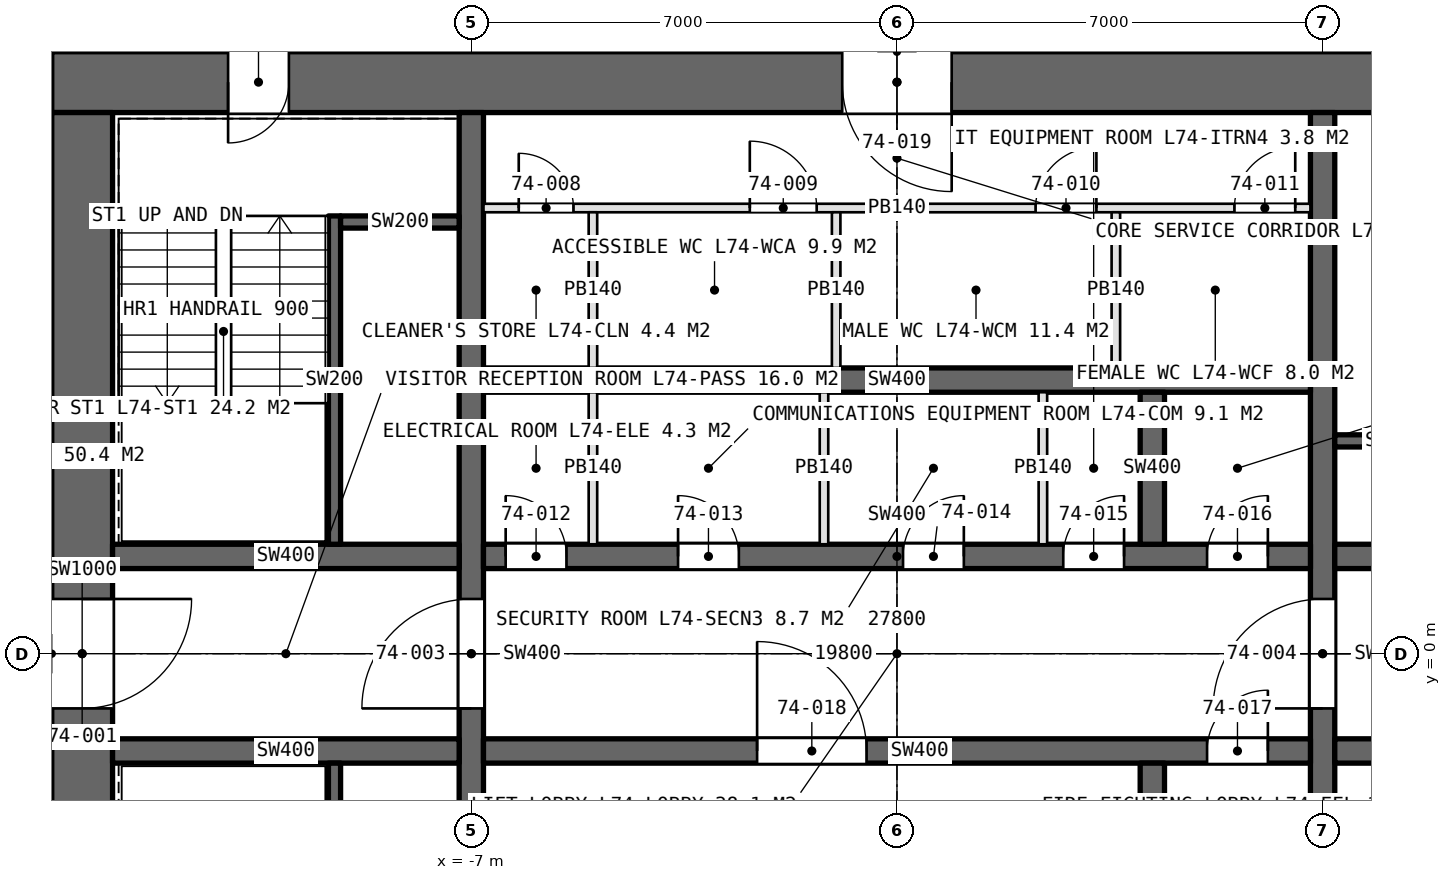
"""IFC4 building model, lengths in metres.
Left out: names, types, materials, properties, quantities, classifications, styles, units other than length and angle.
Written with IfcOpenShell. Run it as: python <this file> out.ifc"""

import sys

from ifc_helpers import new_model, si_unit, direction, frame, frame_2d, origin, place, context, subcontext, project, spatial, rectangle, extrude, element, fill, save


model = new_model("IFC4")
c1 = context("Model", 3, precision=1e-05, world=origin(), true_north=direction((0.0, 1.0)))
c2 = subcontext(c1, "Body", "Model", "MODEL_VIEW")
j1 = project(units=[si_unit("LENGTHUNIT", "METRE"), si_unit("PLANEANGLEUNIT", "RADIAN")], contexts=[c1])
p1 = place(None, origin())
s1 = spatial("IfcSite", under=j1, at=p1, CompositionType="ELEMENT")
p2 = place(p1, origin())
s2 = spatial("IfcBuilding", under=s1, at=p2, CompositionType="ELEMENT")
p3 = place(p2, frame((0.0, 0.0, 330.0)))
s3 = spatial("IfcBuildingStorey", under=s2, at=p3, CompositionType="ELEMENT", Elevation=330.0)
p4 = place(p3, frame((13.9, 9.4, 0.0), z_axis=(0.0, 0.0, 1.0), x_axis=(-1.0, 0.0, 0.0)))
e1 = element("IfcWall", 1, at=p4, inside=s3, PredefinedType="SHEAR", context=c2, shape_type="SweptSolid", body=[
    extrude(rectangle(XDim=27.8, YDim=1.0, at=frame_2d((13.9, 0.0))), origin(), (0.0, 0.0, 1.0), 4.2),
])
p5 = place(p4, frame((23.9, 0.0, 0.0)))
e2 = element("IfcOpeningElement", 2, at=p5, cuts=e1, PredefinedType="OPENING", context=c2, shape_type="SweptSolid", body=[
    extrude(rectangle(XDim=1.0, YDim=2.4, at=frame_2d((0.5, 1.2))), frame((0.0, 0.51, 0.0), z_axis=(0.0, -1.0, 0.0), x_axis=(1.0, 0.0, 0.0)), (0.0, 0.0, 1.0), 1.02),
])
p6 = place(p4, frame((13.0, 0.0, 0.0)))
e3 = element("IfcOpeningElement", 3, at=p6, cuts=e1, PredefinedType="OPENING", context=c2, shape_type="SweptSolid", body=[
    extrude(rectangle(XDim=1.8, YDim=2.4, at=frame_2d((0.9, 1.2))), frame((0.0, 0.51, 0.0), z_axis=(0.0, -1.0, 0.0), x_axis=(1.0, 0.0, 0.0)), (0.0, 0.0, 1.0), 1.02),
])
p7 = place(p3, frame((-13.4, 8.9, 0.0), z_axis=(0.0, 0.0, 1.0), x_axis=(0.0, -1.0, 0.0)))
e4 = element("IfcWall", 4, at=p7, inside=s3, PredefinedType="SHEAR", context=c2, shape_type="SweptSolid", body=[
    extrude(rectangle(XDim=17.8, YDim=1.0, at=frame_2d((8.9, 0.0))), origin(), (0.0, 0.0, 1.0), 4.2),
])
p8 = place(p7, frame((8.0, 0.0, 0.0)))
e5 = element("IfcOpeningElement", 5, at=p8, cuts=e4, PredefinedType="OPENING", context=c2, shape_type="SweptSolid", body=[
    extrude(rectangle(XDim=1.8, YDim=2.4, at=frame_2d((0.9, 1.2))), frame((0.0, 0.51, 0.0), z_axis=(0.0, -1.0, 0.0), x_axis=(1.0, 0.0, 0.0)), (0.0, 0.0, 1.0), 1.02),
])
p9 = place(p7, frame((16.6, 0.0, 0.0)))
e6 = element("IfcOpeningElement", 6, at=p9, cuts=e4, PredefinedType="OPENING", context=c2, shape_type="SweptSolid", body=[
    extrude(rectangle(XDim=1.0, YDim=2.4, at=frame_2d((0.5, 1.2))), frame((0.0, 0.51, 0.0), z_axis=(0.0, -1.0, 0.0), x_axis=(1.0, 0.0, 0.0)), (0.0, 0.0, 1.0), 1.02),
])
p10 = place(p3, frame((-7.0, -8.9, 0.0), z_axis=(0.0, 0.0, 1.0), x_axis=(0.0, 1.0, 0.0)))
e7 = element("IfcWall", 7, at=p10, inside=s3, PredefinedType="SHEAR", context=c2, shape_type="SweptSolid", body=[
    extrude(rectangle(XDim=17.8, YDim=0.4, at=frame_2d((8.9, 0.0))), origin(), (0.0, 0.0, 1.0), 4.2),
])
p11 = place(p10, frame((8.0, 0.0, 0.0)))
e8 = element("IfcOpeningElement", 8, at=p11, cuts=e7, PredefinedType="OPENING", context=c2, shape_type="SweptSolid", body=[
    extrude(rectangle(XDim=1.8, YDim=2.4, at=frame_2d((0.9, 1.2))), frame((0.0, 0.21, 0.0), z_axis=(0.0, -1.0, 0.0), x_axis=(1.0, 0.0, 0.0)), (0.0, 0.0, 1.0), 0.42),
])
p12 = place(p3, frame((7.0, -8.9, 0.0), z_axis=(0.0, 0.0, 1.0), x_axis=(0.0, 1.0, 0.0)))
e9 = element("IfcWall", 9, at=p12, inside=s3, PredefinedType="SHEAR", context=c2, shape_type="SweptSolid", body=[
    extrude(rectangle(XDim=17.8, YDim=0.4, at=frame_2d((8.9, 0.0))), origin(), (0.0, 0.0, 1.0), 4.2),
])
p13 = place(p12, frame((8.0, 0.0, 0.0)))
e10 = element("IfcOpeningElement", 10, at=p13, cuts=e9, PredefinedType="OPENING", context=c2, shape_type="SweptSolid", body=[
    extrude(rectangle(XDim=1.8, YDim=2.4, at=frame_2d((0.9, 1.2))), frame((0.0, 0.21, 0.0), z_axis=(0.0, -1.0, 0.0), x_axis=(1.0, 0.0, 0.0)), (0.0, 0.0, 1.0), 0.42),
])
p14 = place(p3, frame((-6.8, 1.6, 0.0), z_axis=(0.0, 0.0, 1.0), x_axis=(1.0, 0.0, 0.0)))
e11 = element("IfcWall", 11, at=p14, inside=s3, PredefinedType="SHEAR", context=c2, shape_type="SweptSolid", body=[
    extrude(rectangle(XDim=13.6, YDim=0.4, at=frame_2d((6.8, 0.0))), origin(), (0.0, 0.0, 1.0), 4.2),
])
p15 = place(p14, frame((0.365, 0.0, 0.0)))
e12 = element("IfcOpeningElement", 12, at=p15, cuts=e11, PredefinedType="OPENING", context=c2, shape_type="SweptSolid", body=[
    extrude(rectangle(XDim=1.0, YDim=2.4, at=frame_2d((0.5, 1.2))), frame((0.0, 0.21, 0.0), z_axis=(0.0, -1.0, 0.0), x_axis=(1.0, 0.0, 0.0)), (0.0, 0.0, 1.0), 0.42),
])
p16 = place(p14, frame((3.2, 0.0, 0.0)))
e13 = element("IfcOpeningElement", 13, at=p16, cuts=e11, PredefinedType="OPENING", context=c2, shape_type="SweptSolid", body=[
    extrude(rectangle(XDim=1.0, YDim=2.4, at=frame_2d((0.5, 1.2))), frame((0.0, 0.21, 0.0), z_axis=(0.0, -1.0, 0.0), x_axis=(1.0, 0.0, 0.0)), (0.0, 0.0, 1.0), 0.42),
])
p17 = place(p14, frame((6.9, 0.0, 0.0)))
e14 = element("IfcOpeningElement", 14, at=p17, cuts=e11, PredefinedType="OPENING", context=c2, shape_type="SweptSolid", body=[
    extrude(rectangle(XDim=1.0, YDim=2.4, at=frame_2d((0.5, 1.2))), frame((0.0, 0.21, 0.0), z_axis=(0.0, -1.0, 0.0), x_axis=(1.0, 0.0, 0.0)), (0.0, 0.0, 1.0), 0.42),
])
p18 = place(p14, frame((9.535, 0.0, 0.0)))
e15 = element("IfcOpeningElement", 15, at=p18, cuts=e11, PredefinedType="OPENING", context=c2, shape_type="SweptSolid", body=[
    extrude(rectangle(XDim=1.0, YDim=2.4, at=frame_2d((0.5, 1.2))), frame((0.0, 0.21, 0.0), z_axis=(0.0, -1.0, 0.0), x_axis=(1.0, 0.0, 0.0)), (0.0, 0.0, 1.0), 0.42),
])
p19 = place(p14, frame((11.9, 0.0, 0.0)))
e16 = element("IfcOpeningElement", 16, at=p19, cuts=e11, PredefinedType="OPENING", context=c2, shape_type="SweptSolid", body=[
    extrude(rectangle(XDim=1.0, YDim=2.4, at=frame_2d((0.5, 1.2))), frame((0.0, 0.21, 0.0), z_axis=(0.0, -1.0, 0.0), x_axis=(1.0, 0.0, 0.0)), (0.0, 0.0, 1.0), 0.42),
])
p20 = place(p3, frame((-6.8, -1.6, 0.0), z_axis=(0.0, 0.0, 1.0), x_axis=(1.0, 0.0, 0.0)))
e17 = element("IfcWall", 17, at=p20, inside=s3, PredefinedType="SHEAR", context=c2, shape_type="SweptSolid", body=[
    extrude(rectangle(XDim=13.6, YDim=0.4, at=frame_2d((6.8, 0.0))), origin(), (0.0, 0.0, 1.0), 4.2),
])
p21 = place(p20, frame((11.9, 0.0, 0.0)))
e18 = element("IfcOpeningElement", 18, at=p21, cuts=e17, PredefinedType="OPENING", context=c2, shape_type="SweptSolid", body=[
    extrude(rectangle(XDim=1.0, YDim=2.4, at=frame_2d((0.5, 1.2))), frame((0.0, 0.21, 0.0), z_axis=(0.0, -1.0, 0.0), x_axis=(1.0, 0.0, 0.0)), (0.0, 0.0, 1.0), 0.42),
])
p22 = place(p20, frame((4.5, 0.0, 0.0)))
e19 = element("IfcOpeningElement", 19, at=p22, cuts=e17, PredefinedType="OPENING", context=c2, shape_type="SweptSolid", body=[
    extrude(rectangle(XDim=1.8, YDim=2.4, at=frame_2d((0.9, 1.2))), frame((0.0, 0.21, 0.0), z_axis=(0.0, -1.0, 0.0), x_axis=(1.0, 0.0, 0.0)), (0.0, 0.0, 1.0), 0.42),
])
p23 = place(p3, frame((-6.8, 4.5, 0.0), z_axis=(0.0, 0.0, 1.0), x_axis=(1.0, 0.0, 0.0)))
e20 = element("IfcWall", 20, at=p23, inside=s3, PredefinedType="SHEAR", context=c2, shape_type="SweptSolid", body=[
    extrude(rectangle(XDim=13.6, YDim=0.4, at=frame_2d((6.8, 0.0))), origin(), (0.0, 0.0, 1.0), 4.2),
])
for number, where, z_axis, x_axis in (
    (21, (-12.9, 1.6, 0.0), (0.0, 0.0, 1.0), (1.0, 0.0, 0.0)),
    (22, (-12.9, -1.6, 0.0), (0.0, 0.0, 1.0), (1.0, 0.0, 0.0)),
):
    element("IfcWall", number, at=place(p3, frame(where, z_axis=z_axis, x_axis=x_axis)), inside=s3, PredefinedType="SHEAR", context=c2, shape_type="SweptSolid", body=[
        extrude(rectangle(XDim=5.7, YDim=0.4, at=frame_2d((2.85, 0.0))), origin(), (0.0, 0.0, 1.0), 4.2),
    ])
p24 = place(p3, frame((7.2, 1.6, 0.0), z_axis=(0.0, 0.0, 1.0), x_axis=(1.0, 0.0, 0.0)))
e23 = element("IfcWall", 23, at=p24, inside=s3, PredefinedType="SHEAR", context=c2, shape_type="SweptSolid", body=[
    extrude(rectangle(XDim=5.7, YDim=0.4, at=frame_2d((2.85, 0.0))), origin(), (0.0, 0.0, 1.0), 4.2),
])
p25 = place(p24, frame((0.7, 0.0, 0.0)))
e24 = element("IfcOpeningElement", 24, at=p25, cuts=e23, PredefinedType="OPENING", context=c2, shape_type="SweptSolid", body=[
    extrude(rectangle(XDim=1.0, YDim=2.4, at=frame_2d((0.5, 1.2))), frame((0.0, 0.21, 0.0), z_axis=(0.0, -1.0, 0.0), x_axis=(1.0, 0.0, 0.0)), (0.0, 0.0, 1.0), 0.42),
])
p26 = place(p3, frame((7.2, -1.6, 0.0), z_axis=(0.0, 0.0, 1.0), x_axis=(1.0, 0.0, 0.0)))
e25 = element("IfcWall", 25, at=p26, inside=s3, PredefinedType="SHEAR", context=c2, shape_type="SweptSolid", body=[
    extrude(rectangle(XDim=5.7, YDim=0.4, at=frame_2d((2.85, 0.0))), origin(), (0.0, 0.0, 1.0), 4.2),
])
p27 = place(p26, frame((0.9, 0.0, 0.0)))
e26 = element("IfcOpeningElement", 26, at=p27, cuts=e25, PredefinedType="OPENING", context=c2, shape_type="SweptSolid", body=[
    extrude(rectangle(XDim=1.3, YDim=2.4, at=frame_2d((0.65, 1.2))), frame((0.0, 0.21, 0.0), z_axis=(0.0, -1.0, 0.0), x_axis=(1.0, 0.0, 0.0)), (0.0, 0.0, 1.0), 0.42),
])
p28 = place(p26, frame((3.95, 0.0, 0.0)))
e27 = element("IfcOpeningElement", 27, at=p28, cuts=e25, PredefinedType="OPENING", context=c2, shape_type="SweptSolid", body=[
    extrude(rectangle(XDim=1.3, YDim=2.4, at=frame_2d((0.65, 1.2))), frame((0.0, 0.21, 0.0), z_axis=(0.0, -1.0, 0.0), x_axis=(1.0, 0.0, 0.0)), (0.0, 0.0, 1.0), 0.42),
])
for number, where, z_axis, x_axis in (
    (28, (4.2, 1.8, 0.0), (0.0, 0.0, 1.0), (0.0, 1.0, 0.0)),
    (29, (4.2, -4.3, 0.0), (0.0, 0.0, 1.0), (0.0, 1.0, 0.0)),
):
    element("IfcWall", number, at=place(p3, frame(where, z_axis=z_axis, x_axis=x_axis)), inside=s3, PredefinedType="SHEAR", context=c2, shape_type="SweptSolid", body=[
        extrude(rectangle(XDim=2.5, YDim=0.4, at=frame_2d((1.25, 0.0))), origin(), (0.0, 0.0, 1.0), 4.2),
    ])
p29 = place(p3, frame((-6.8, 7.33, 0.0), z_axis=(0.0, 0.0, 1.0), x_axis=(1.0, 0.0, 0.0)))
e30 = element("IfcWall", 30, at=p29, inside=s3, PredefinedType="PARTITIONING", context=c2, shape_type="SweptSolid", body=[
    extrude(rectangle(XDim=13.6, YDim=0.14, at=frame_2d((6.8, 0.0))), origin(), (0.0, 0.0, 1.0), 3.95),
])
p30 = place(p29, frame((0.58, 0.0, 0.0)))
e31 = element("IfcOpeningElement", 31, at=p30, cuts=e30, PredefinedType="OPENING", context=c2, shape_type="SweptSolid", body=[
    extrude(rectangle(XDim=0.9, YDim=2.4, at=frame_2d((0.45, 1.2))), frame((0.0, 0.08, 0.0), z_axis=(0.0, -1.0, 0.0), x_axis=(1.0, 0.0, 0.0)), (0.0, 0.0, 1.0), 0.16),
])
p31 = place(p29, frame((4.38, 0.0, 0.0)))
e32 = element("IfcOpeningElement", 32, at=p31, cuts=e30, PredefinedType="OPENING", context=c2, shape_type="SweptSolid", body=[
    extrude(rectangle(XDim=1.1, YDim=2.4, at=frame_2d((0.55, 1.2))), frame((0.0, 0.08, 0.0), z_axis=(0.0, -1.0, 0.0), x_axis=(1.0, 0.0, 0.0)), (0.0, 0.0, 1.0), 0.16),
])
p32 = place(p29, frame((9.08, 0.0, 0.0)))
e33 = element("IfcOpeningElement", 33, at=p32, cuts=e30, PredefinedType="OPENING", context=c2, shape_type="SweptSolid", body=[
    extrude(rectangle(XDim=1.0, YDim=2.4, at=frame_2d((0.5, 1.2))), frame((0.0, 0.08, 0.0), z_axis=(0.0, -1.0, 0.0), x_axis=(1.0, 0.0, 0.0)), (0.0, 0.0, 1.0), 0.16),
])
p33 = place(p29, frame((12.35, 0.0, 0.0)))
e34 = element("IfcOpeningElement", 34, at=p33, cuts=e30, PredefinedType="OPENING", context=c2, shape_type="SweptSolid", body=[
    extrude(rectangle(XDim=1.0, YDim=2.4, at=frame_2d((0.5, 1.2))), frame((0.0, 0.08, 0.0), z_axis=(0.0, -1.0, 0.0), x_axis=(1.0, 0.0, 0.0)), (0.0, 0.0, 1.0), 0.16),
])
for number, where, z_axis, x_axis in (
    (35, (-5.0, 4.7, 0.0), (0.0, 0.0, 1.0), (0.0, 1.0, 0.0)),
    (36, (-1.0, 4.7, 0.0), (0.0, 0.0, 1.0), (0.0, 1.0, 0.0)),
    (37, (3.6, 4.7, 0.0), (0.0, 0.0, 1.0), (0.0, 1.0, 0.0)),
):
    element("IfcWall", number, at=place(p3, frame(where, z_axis=z_axis, x_axis=x_axis)), inside=s3, PredefinedType="PARTITIONING", context=c2, shape_type="SweptSolid", body=[
        extrude(rectangle(XDim=2.56, YDim=0.14, at=frame_2d((1.28, 0.0))), origin(), (0.0, 0.0, 1.0), 3.95),
    ])
for number, where, z_axis, x_axis in (
    (38, (-5.0, 1.8, 0.0), (0.0, 0.0, 1.0), (0.0, 1.0, 0.0)),
    (39, (-1.2, 1.8, 0.0), (0.0, 0.0, 1.0), (0.0, 1.0, 0.0)),
    (40, (2.4, 1.8, 0.0), (0.0, 0.0, 1.0), (0.0, 1.0, 0.0)),
):
    element("IfcWall", number, at=place(p3, frame(where, z_axis=z_axis, x_axis=x_axis)), inside=s3, PredefinedType="PARTITIONING", context=c2, shape_type="SweptSolid", body=[
        extrude(rectangle(XDim=2.5, YDim=0.14, at=frame_2d((1.25, 0.0))), origin(), (0.0, 0.0, 1.0), 3.95),
    ])
p34 = place(p3, frame((-9.25, 7.2, 0.0), z_axis=(0.0, 0.0, 1.0), x_axis=(0.0, -1.0, 0.0)))
e41 = element("IfcWall", 41, at=p34, inside=s3, PredefinedType="SOLIDWALL", context=c2, shape_type="SweptSolid", body=[
    extrude(rectangle(XDim=5.4, YDim=0.2, at=frame_2d((2.7, 0.0))), origin(), (0.0, 0.0, 1.0), 4.2),
])
p35 = place(p3, frame((-9.15, 7.1, 0.0), z_axis=(0.0, 0.0, 1.0), x_axis=(1.0, 0.0, 0.0)))
e42 = element("IfcWall", 42, at=p35, inside=s3, PredefinedType="SOLIDWALL", context=c2, shape_type="SweptSolid", body=[
    extrude(rectangle(XDim=1.95, YDim=0.2, at=frame_2d((0.975, 0.0))), origin(), (0.0, 0.0, 1.0), 4.2),
])
p36 = place(p3, frame((-9.25, -7.2, 0.0), z_axis=(0.0, 0.0, 1.0), x_axis=(0.0, 1.0, 0.0)))
e43 = element("IfcWall", 43, at=p36, inside=s3, PredefinedType="SOLIDWALL", context=c2, shape_type="SweptSolid", body=[
    extrude(rectangle(XDim=5.4, YDim=0.2, at=frame_2d((2.7, 0.0))), origin(), (0.0, 0.0, 1.0), 4.2),
])
p37 = place(p3, frame((9.15, 3.5, 0.0), z_axis=(0.0, 0.0, 1.0), x_axis=(-1.0, 0.0, 0.0)))
e44 = element("IfcWall", 44, at=p37, inside=s3, PredefinedType="SOLIDWALL", context=c2, shape_type="SweptSolid", body=[
    extrude(rectangle(XDim=1.95, YDim=0.2, at=frame_2d((0.975, 0.0))), origin(), (0.0, 0.0, 1.0), 4.2),
])
p38 = place(p8, origin())
e45 = element("IfcDoor", 45, at=p38, inside=s3, OperationType="DOUBLE_DOOR_SINGLE_SWING", PredefinedType="DOOR", context=c2, shape_type="SweptSolid", body=[
    extrude(rectangle(XDim=1.8, YDim=2.4, at=frame_2d((0.9, 1.2))), frame((0.0, 0.025, 0.0), z_axis=(0.0, -1.0, 0.0), x_axis=(1.0, 0.0, 0.0)), (0.0, 0.0, 1.0), 0.05),
])
fill(e5, e45)
p39 = place(p11, origin())
e46 = element("IfcDoor", 46, at=p39, inside=s3, OperationType="DOUBLE_DOOR_SINGLE_SWING", PredefinedType="DOOR", context=c2, shape_type="SweptSolid", body=[
    extrude(rectangle(XDim=1.8, YDim=2.4, at=frame_2d((0.9, 1.2))), frame((0.0, 0.025, 0.0), z_axis=(0.0, -1.0, 0.0), x_axis=(1.0, 0.0, 0.0)), (0.0, 0.0, 1.0), 0.05),
])
fill(e8, e46)
p40 = place(p13, origin())
e47 = element("IfcDoor", 47, at=p40, inside=s3, OperationType="DOUBLE_DOOR_SINGLE_SWING", PredefinedType="DOOR", context=c2, shape_type="SweptSolid", body=[
    extrude(rectangle(XDim=1.8, YDim=2.4, at=frame_2d((0.9, 1.2))), frame((0.0, 0.025, 0.0), z_axis=(0.0, -1.0, 0.0), x_axis=(1.0, 0.0, 0.0)), (0.0, 0.0, 1.0), 0.05),
])
fill(e10, e47)
p41 = place(p5, origin())
e48 = element("IfcDoor", 48, at=p41, inside=s3, OperationType="SINGLE_SWING_RIGHT", PredefinedType="DOOR", context=c2, shape_type="SweptSolid", body=[
    extrude(rectangle(XDim=1.0, YDim=2.4, at=frame_2d((0.5, 1.2))), frame((0.0, 0.025, 0.0), z_axis=(0.0, -1.0, 0.0), x_axis=(1.0, 0.0, 0.0)), (0.0, 0.0, 1.0), 0.05),
])
fill(e2, e48)
p42 = place(p30, origin())
e49 = element("IfcDoor", 49, at=p42, inside=s3, OperationType="SINGLE_SWING_LEFT", PredefinedType="DOOR", context=c2, shape_type="SweptSolid", body=[
    extrude(rectangle(XDim=0.9, YDim=2.4, at=frame_2d((0.45, 1.2))), frame((0.0, 0.025, 0.0), z_axis=(0.0, -1.0, 0.0), x_axis=(1.0, 0.0, 0.0)), (0.0, 0.0, 1.0), 0.05),
])
fill(e31, e49)
p43 = place(p31, origin())
e50 = element("IfcDoor", 50, at=p43, inside=s3, OperationType="SINGLE_SWING_LEFT", PredefinedType="DOOR", context=c2, shape_type="SweptSolid", body=[
    extrude(rectangle(XDim=1.1, YDim=2.4, at=frame_2d((0.55, 1.2))), frame((0.0, 0.025, 0.0), z_axis=(0.0, -1.0, 0.0), x_axis=(1.0, 0.0, 0.0)), (0.0, 0.0, 1.0), 0.05),
])
fill(e32, e50)
p44 = place(p32, origin())
e51 = element("IfcDoor", 51, at=p44, inside=s3, OperationType="SINGLE_SWING_RIGHT", PredefinedType="DOOR", context=c2, shape_type="SweptSolid", body=[
    extrude(rectangle(XDim=1.0, YDim=2.4, at=frame_2d((0.5, 1.2))), frame((0.0, 0.025, 0.0), z_axis=(0.0, -1.0, 0.0), x_axis=(1.0, 0.0, 0.0)), (0.0, 0.0, 1.0), 0.05),
])
fill(e33, e51)
p45 = place(p33, origin())
e52 = element("IfcDoor", 52, at=p45, inside=s3, OperationType="SINGLE_SWING_RIGHT", PredefinedType="DOOR", context=c2, shape_type="SweptSolid", body=[
    extrude(rectangle(XDim=1.0, YDim=2.4, at=frame_2d((0.5, 1.2))), frame((0.0, 0.025, 0.0), z_axis=(0.0, -1.0, 0.0), x_axis=(1.0, 0.0, 0.0)), (0.0, 0.0, 1.0), 0.05),
])
fill(e34, e52)
p46 = place(p15, origin())
e53 = element("IfcDoor", 53, at=p46, inside=s3, OperationType="SINGLE_SWING_LEFT", PredefinedType="DOOR", context=c2, shape_type="SweptSolid", body=[
    extrude(rectangle(XDim=1.0, YDim=2.4, at=frame_2d((0.5, 1.2))), frame((0.0, 0.025, 0.0), z_axis=(0.0, -1.0, 0.0), x_axis=(1.0, 0.0, 0.0)), (0.0, 0.0, 1.0), 0.05),
])
fill(e12, e53)
p47 = place(p16, origin())
e54 = element("IfcDoor", 54, at=p47, inside=s3, OperationType="SINGLE_SWING_LEFT", PredefinedType="DOOR", context=c2, shape_type="SweptSolid", body=[
    extrude(rectangle(XDim=1.0, YDim=2.4, at=frame_2d((0.5, 1.2))), frame((0.0, 0.025, 0.0), z_axis=(0.0, -1.0, 0.0), x_axis=(1.0, 0.0, 0.0)), (0.0, 0.0, 1.0), 0.05),
])
fill(e13, e54)
p48 = place(p17, origin())
e55 = element("IfcDoor", 55, at=p48, inside=s3, OperationType="SINGLE_SWING_RIGHT", PredefinedType="DOOR", context=c2, shape_type="SweptSolid", body=[
    extrude(rectangle(XDim=1.0, YDim=2.4, at=frame_2d((0.5, 1.2))), frame((0.0, 0.025, 0.0), z_axis=(0.0, -1.0, 0.0), x_axis=(1.0, 0.0, 0.0)), (0.0, 0.0, 1.0), 0.05),
])
fill(e14, e55)
p49 = place(p18, origin())
e56 = element("IfcDoor", 56, at=p49, inside=s3, OperationType="SINGLE_SWING_RIGHT", PredefinedType="DOOR", context=c2, shape_type="SweptSolid", body=[
    extrude(rectangle(XDim=1.0, YDim=2.4, at=frame_2d((0.5, 1.2))), frame((0.0, 0.025, 0.0), z_axis=(0.0, -1.0, 0.0), x_axis=(1.0, 0.0, 0.0)), (0.0, 0.0, 1.0), 0.05),
])
fill(e15, e56)
p50 = place(p19, origin())
e57 = element("IfcDoor", 57, at=p50, inside=s3, OperationType="SINGLE_SWING_RIGHT", PredefinedType="DOOR", context=c2, shape_type="SweptSolid", body=[
    extrude(rectangle(XDim=1.0, YDim=2.4, at=frame_2d((0.5, 1.2))), frame((0.0, 0.025, 0.0), z_axis=(0.0, -1.0, 0.0), x_axis=(1.0, 0.0, 0.0)), (0.0, 0.0, 1.0), 0.05),
])
fill(e16, e57)
p51 = place(p21, origin())
e58 = element("IfcDoor", 58, at=p51, inside=s3, OperationType="SINGLE_SWING_RIGHT", PredefinedType="DOOR", context=c2, shape_type="SweptSolid", body=[
    extrude(rectangle(XDim=1.0, YDim=2.4, at=frame_2d((0.5, 1.2))), frame((0.0, 0.025, 0.0), z_axis=(0.0, -1.0, 0.0), x_axis=(1.0, 0.0, 0.0)), (0.0, 0.0, 1.0), 0.05),
])
fill(e18, e58)
p52 = place(p22, origin())
e59 = element("IfcDoor", 59, at=p52, inside=s3, OperationType="DOUBLE_DOOR_SINGLE_SWING", PredefinedType="DOOR", context=c2, shape_type="SweptSolid", body=[
    extrude(rectangle(XDim=1.8, YDim=2.4, at=frame_2d((0.9, 1.2))), frame((0.0, 0.025, 0.0), z_axis=(0.0, -1.0, 0.0), x_axis=(1.0, 0.0, 0.0)), (0.0, 0.0, 1.0), 0.05),
])
fill(e19, e59)
p53 = place(p6, origin())
e60 = element("IfcDoor", 60, at=p53, inside=s3, OperationType="DOUBLE_DOOR_SINGLE_SWING", PredefinedType="DOOR", context=c2, shape_type="SweptSolid", body=[
    extrude(rectangle(XDim=1.8, YDim=2.4, at=frame_2d((0.9, 1.2))), frame((0.0, 0.025, 0.0), z_axis=(0.0, -1.0, 0.0), x_axis=(1.0, 0.0, 0.0)), (0.0, 0.0, 1.0), 0.05),
])
fill(e3, e60)
save(model, sys.argv[1])
